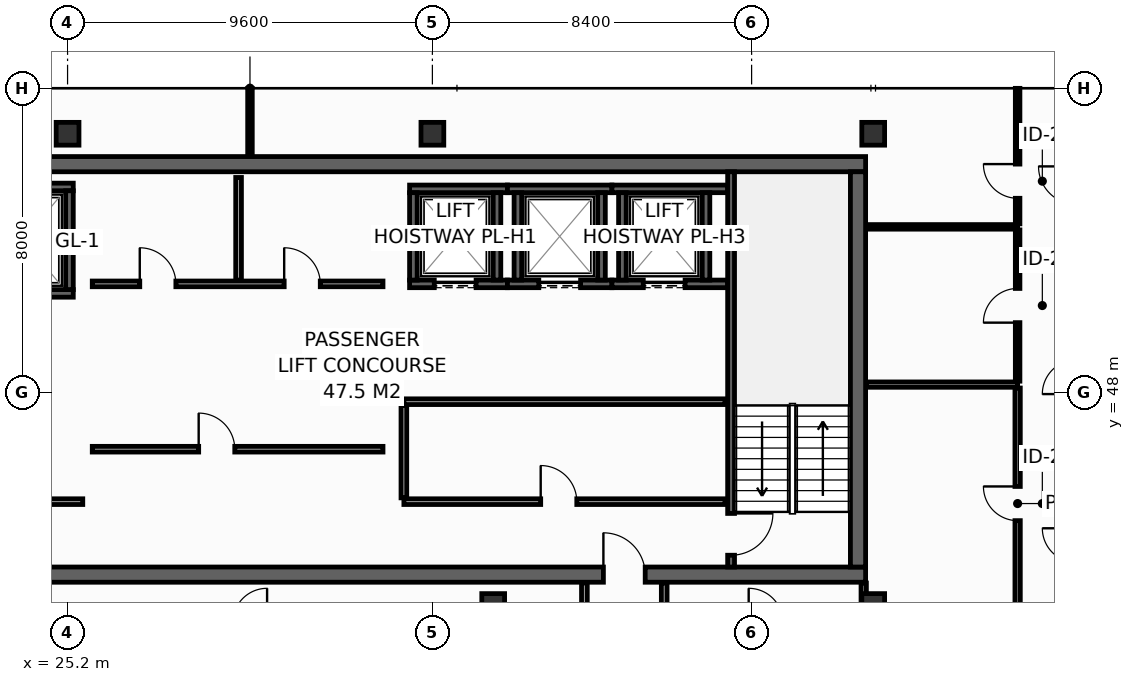
"""IFC4 building model, lengths in metres.
Left out: names, types, materials, properties, quantities, classifications, styles, units other than length and angle.
Written with IfcOpenShell. Run it as: python <this file> out.ifc"""

import sys

from ifc_helpers import new_model, si_unit, direction, frame, frame_2d, origin, origin_2d, place, context, subcontext, project, spatial, rectangle, hollow_rectangle, extrude, element, fill, save


model = new_model("IFC4")
c1 = context("Model", 3, precision=1e-05, world=origin(), true_north=direction((0.0, 1.0)))
c2 = subcontext(c1, "Body", "Model", "MODEL_VIEW")
j1 = project(units=[si_unit("LENGTHUNIT", "METRE"), si_unit("PLANEANGLEUNIT", "RADIAN")], contexts=[c1])
p1 = place(None, origin())
s1 = spatial("IfcSite", under=j1, at=p1, CompositionType="ELEMENT")
p2 = place(p1, origin())
s2 = spatial("IfcBuilding", under=s1, at=p2, CompositionType="ELEMENT")
p3 = place(p2, frame((0.0, 0.0, 306.6)))
s3 = spatial("IfcBuildingStorey", under=s2, at=p3, CompositionType="ELEMENT", Elevation=306.6)
p4 = place(p3, frame((13.7, 43.2, 0.0), z_axis=(0.0, 0.0, 1.0), x_axis=(1.0, 0.0, 0.0)))
e1 = element("IfcWall", 1, at=p4, inside=s3, PredefinedType="SHEAR", context=c2, shape_type="SweptSolid", body=[
    extrude(rectangle(XDim=32.5, YDim=0.4, at=frame_2d((16.25, 0.0))), origin(), (0.0, 0.0, 1.0), 3.55),
])
p5 = place(p4, frame((5.4, 0.0, 0.0)))
e2 = element("IfcOpeningElement", 2, at=p5, cuts=e1, PredefinedType="OPENING", context=c2, shape_type="SweptSolid", body=[
    extrude(rectangle(XDim=1.1, YDim=2.15, at=frame_2d((0.55, 1.075))), frame((0.0, 0.21, 0.0), z_axis=(0.0, -1.0, 0.0), x_axis=(1.0, 0.0, 0.0)), (0.0, 0.0, 1.0), 0.42),
])
p6 = place(p4, frame((25.6, 0.0, 0.0)))
e3 = element("IfcOpeningElement", 3, at=p6, cuts=e1, PredefinedType="OPENING", context=c2, shape_type="SweptSolid", body=[
    extrude(rectangle(XDim=1.1, YDim=2.15, at=frame_2d((0.55, 1.075))), frame((0.0, 0.21, 0.0), z_axis=(0.0, -1.0, 0.0), x_axis=(1.0, 0.0, 0.0)), (0.0, 0.0, 1.0), 0.42),
])
p7 = place(p3, frame((13.7, 54.0, 0.0), z_axis=(0.0, 0.0, 1.0), x_axis=(1.0, 0.0, 0.0)))
e4 = element("IfcWall", 4, at=p7, inside=s3, PredefinedType="SHEAR", context=c2, shape_type="SweptSolid", body=[
    extrude(rectangle(XDim=32.5, YDim=0.4, at=frame_2d((16.25, 0.0))), origin(), (0.0, 0.0, 1.0), 3.55),
])
p8 = place(p3, frame((46.0, 43.4, 0.0), z_axis=(0.0, 0.0, 1.0), x_axis=(0.0, 1.0, 0.0)))
e5 = element("IfcWall", 5, at=p8, inside=s3, PredefinedType="SHEAR", context=c2, shape_type="SweptSolid", body=[
    extrude(rectangle(XDim=10.4, YDim=0.4, at=frame_2d((5.2, 0.0))), origin(), (0.0, 0.0, 1.0), 3.55),
])
for number, where, z_axis, x_axis in (
    (6, (25.2, 54.8, 0.0), (0.0, 0.0, 1.0), (1.0, 0.0, 0.0)),
    (7, (34.8, 54.8, 0.0), (0.0, 0.0, 1.0), (1.0, 0.0, 0.0)),
    (8, (46.4, 54.8, 0.0), (0.0, 0.0, 1.0), (1.0, 0.0, 0.0)),
    (9, (36.4, 42.4, 0.0), (0.0, 0.0, 1.0), (1.0, 0.0, 0.0)),
    (10, (46.4, 42.4, 0.0), (0.0, 0.0, 1.0), (1.0, 0.0, 0.0)),
):
    element("IfcColumn", number, at=place(p3, frame(where, z_axis=z_axis, x_axis=x_axis)), inside=s3, PredefinedType="COLUMN", context=c2, shape_type="SweptSolid", body=[
        extrude(hollow_rectangle(XDim=0.6, YDim=0.6, WallThickness=0.028, at=origin_2d()), origin(), (0.0, 0.0, 1.0), 3.8),
    ])
p9 = place(p3, frame((22.5, 50.6, 0.0), z_axis=(0.0, 0.0, 1.0), x_axis=(1.0, 0.0, 0.0)))
e11 = element("IfcWall", 11, at=p9, inside=s3, PredefinedType="SHEAR", context=c2, shape_type="SweptSolid", body=[
    extrude(rectangle(XDim=2.85, YDim=0.2, at=frame_2d((1.425, 0.0))), origin(), (0.0, 0.0, 1.0), 3.55),
])
p10 = place(p9, frame((0.925, 0.0, 0.0)))
e12 = element("IfcOpeningElement", 12, at=p10, cuts=e11, PredefinedType="OPENING", context=c2, shape_type="SweptSolid", body=[
    extrude(rectangle(XDim=1.25, YDim=2.3, at=frame_2d((0.625, 1.15))), frame((0.0, 0.11, 0.0), z_axis=(0.0, -1.0, 0.0), x_axis=(1.0, 0.0, 0.0)), (0.0, 0.0, 1.0), 0.22),
])
p11 = place(p3, frame((22.5, 53.4, 0.0), z_axis=(0.0, 0.0, 1.0), x_axis=(1.0, 0.0, 0.0)))
e13 = element("IfcWall", 13, at=p11, inside=s3, PredefinedType="SHEAR", context=c2, shape_type="SweptSolid", body=[
    extrude(rectangle(XDim=2.85, YDim=0.2, at=frame_2d((1.425, 0.0))), origin(), (0.0, 0.0, 1.0), 3.55),
])
p12 = place(p3, frame((25.25, 50.7, 0.0), z_axis=(0.0, 0.0, 1.0), x_axis=(0.0, 1.0, 0.0)))
e14 = element("IfcWall", 14, at=p12, inside=s3, PredefinedType="SHEAR", context=c2, shape_type="SweptSolid", body=[
    extrude(rectangle(XDim=2.6, YDim=0.2, at=frame_2d((1.3, 0.0))), origin(), (0.0, 0.0, 1.0), 3.55),
])
p13 = place(p3, frame((34.2, 50.85, 0.0), z_axis=(0.0, 0.0, 1.0), x_axis=(1.0, 0.0, 0.0)))
e15 = element("IfcWall", 15, at=p13, inside=s3, PredefinedType="SHEAR", context=c2, shape_type="SweptSolid", body=[
    extrude(rectangle(XDim=2.575, YDim=0.2, at=frame_2d((1.288, 0.0))), origin(), (0.0, 0.0, 1.0), 3.55),
])
p14 = place(p13, frame((0.65, 0.0, 0.0)))
e16 = element("IfcOpeningElement", 16, at=p14, cuts=e15, PredefinedType="OPENING", context=c2, shape_type="SweptSolid", body=[
    extrude(rectangle(XDim=1.1, YDim=2.2, at=frame_2d((0.55, 1.1))), frame((0.0, 0.11, 0.0), z_axis=(0.0, -1.0, 0.0), x_axis=(1.0, 0.0, 0.0)), (0.0, 0.0, 1.0), 0.22),
])
p15 = place(p3, frame((34.2, 53.35, 0.0), z_axis=(0.0, 0.0, 1.0), x_axis=(1.0, 0.0, 0.0)))
e17 = element("IfcWall", 17, at=p15, inside=s3, PredefinedType="SHEAR", context=c2, shape_type="SweptSolid", body=[
    extrude(rectangle(XDim=2.575, YDim=0.2, at=frame_2d((1.288, 0.0))), origin(), (0.0, 0.0, 1.0), 3.55),
])
for number, where, z_axis, x_axis in (
    (18, (34.3, 50.95, 0.0), (0.0, 0.0, 1.0), (0.0, 1.0, 0.0)),
    (19, (36.5, 50.95, 0.0), (0.0, 0.0, 1.0), (0.0, 1.0, 0.0)),
):
    element("IfcWall", number, at=place(p3, frame(where, z_axis=z_axis, x_axis=x_axis)), inside=s3, PredefinedType="SHEAR", context=c2, shape_type="SweptSolid", body=[
        extrude(rectangle(XDim=2.3, YDim=0.2, at=frame_2d((1.15, 0.0))), origin(), (0.0, 0.0, 1.0), 3.55),
    ])
p16 = place(p3, frame((36.775, 50.85, 0.0), z_axis=(0.0, 0.0, 1.0), x_axis=(1.0, 0.0, 0.0)))
e20 = element("IfcWall", 20, at=p16, inside=s3, PredefinedType="SHEAR", context=c2, shape_type="SweptSolid", body=[
    extrude(rectangle(XDim=2.75, YDim=0.2, at=frame_2d((1.375, 0.0))), origin(), (0.0, 0.0, 1.0), 3.55),
])
p17 = place(p16, frame((0.825, 0.0, 0.0)))
e21 = element("IfcOpeningElement", 21, at=p17, cuts=e20, PredefinedType="OPENING", context=c2, shape_type="SweptSolid", body=[
    extrude(rectangle(XDim=1.1, YDim=2.2, at=frame_2d((0.55, 1.1))), frame((0.0, 0.11, 0.0), z_axis=(0.0, -1.0, 0.0), x_axis=(1.0, 0.0, 0.0)), (0.0, 0.0, 1.0), 0.22),
])
p18 = place(p3, frame((36.775, 53.35, 0.0), z_axis=(0.0, 0.0, 1.0), x_axis=(1.0, 0.0, 0.0)))
e22 = element("IfcWall", 22, at=p18, inside=s3, PredefinedType="SHEAR", context=c2, shape_type="SweptSolid", body=[
    extrude(rectangle(XDim=2.75, YDim=0.2, at=frame_2d((1.375, 0.0))), origin(), (0.0, 0.0, 1.0), 3.55),
])
for number, where, z_axis, x_axis in (
    (23, (37.05, 50.95, 0.0), (0.0, 0.0, 1.0), (0.0, 1.0, 0.0)),
    (24, (39.25, 50.95, 0.0), (0.0, 0.0, 1.0), (0.0, 1.0, 0.0)),
):
    element("IfcWall", number, at=place(p3, frame(where, z_axis=z_axis, x_axis=x_axis)), inside=s3, PredefinedType="SHEAR", context=c2, shape_type="SweptSolid", body=[
        extrude(rectangle(XDim=2.3, YDim=0.2, at=frame_2d((1.15, 0.0))), origin(), (0.0, 0.0, 1.0), 3.55),
    ])
p19 = place(p3, frame((39.525, 50.85, 0.0), z_axis=(0.0, 0.0, 1.0), x_axis=(1.0, 0.0, 0.0)))
e25 = element("IfcWall", 25, at=p19, inside=s3, PredefinedType="SHEAR", context=c2, shape_type="SweptSolid", body=[
    extrude(rectangle(XDim=3.045, YDim=0.2, at=frame_2d((1.522, 0.0))), origin(), (0.0, 0.0, 1.0), 3.55),
])
p20 = place(p19, frame((0.825, 0.0, 0.0)))
e26 = element("IfcOpeningElement", 26, at=p20, cuts=e25, PredefinedType="OPENING", context=c2, shape_type="SweptSolid", body=[
    extrude(rectangle(XDim=1.1, YDim=2.2, at=frame_2d((0.55, 1.1))), frame((0.0, 0.11, 0.0), z_axis=(0.0, -1.0, 0.0), x_axis=(1.0, 0.0, 0.0)), (0.0, 0.0, 1.0), 0.22),
])
p21 = place(p3, frame((39.525, 53.35, 0.0), z_axis=(0.0, 0.0, 1.0), x_axis=(1.0, 0.0, 0.0)))
e27 = element("IfcWall", 27, at=p21, inside=s3, PredefinedType="SHEAR", context=c2, shape_type="SweptSolid", body=[
    extrude(rectangle(XDim=3.045, YDim=0.2, at=frame_2d((1.522, 0.0))), origin(), (0.0, 0.0, 1.0), 3.55),
])
for number, where, z_axis, x_axis in (
    (28, (39.8, 50.95, 0.0), (0.0, 0.0, 1.0), (0.0, 1.0, 0.0)),
    (29, (42.0, 50.95, 0.0), (0.0, 0.0, 1.0), (0.0, 1.0, 0.0)),
):
    element("IfcWall", number, at=place(p3, frame(where, z_axis=z_axis, x_axis=x_axis)), inside=s3, PredefinedType="SHEAR", context=c2, shape_type="SweptSolid", body=[
        extrude(rectangle(XDim=2.3, YDim=0.2, at=frame_2d((1.15, 0.0))), origin(), (0.0, 0.0, 1.0), 3.55),
    ])
p22 = place(p3, frame((42.66, 53.8, 0.0), z_axis=(0.0, 0.0, 1.0), x_axis=(0.0, -1.0, 0.0)))
e30 = element("IfcWall", 30, at=p22, inside=s3, PredefinedType="SHEAR", context=c2, shape_type="SweptSolid", body=[
    extrude(rectangle(XDim=10.4, YDim=0.18, at=frame_2d((5.2, 0.0))), origin(), (0.0, 0.0, 1.0), 3.55),
])
p23 = place(p22, frame((8.99, 0.0, 0.0)))
e31 = element("IfcOpeningElement", 31, at=p23, cuts=e30, PredefinedType="OPENING", context=c2, shape_type="SweptSolid", body=[
    extrude(rectangle(XDim=1.1, YDim=2.15, at=frame_2d((0.55, 1.075))), frame((0.0, 0.1, 0.0), z_axis=(0.0, -1.0, 0.0), x_axis=(1.0, 0.0, 0.0)), (0.0, 0.0, 1.0), 0.2),
])
p24 = place(p3, frame((22.68, 45.12, 0.0), z_axis=(0.0, 0.0, 1.0), x_axis=(1.0, 0.0, 0.0)))
e32 = element("IfcWall", 32, at=p24, inside=s3, PredefinedType="PARTITIONING", context=c2, shape_type="SweptSolid", body=[
    extrude(rectangle(XDim=2.92, YDim=0.15, at=frame_2d((1.46, 0.0))), origin(), (0.0, 0.0, 1.0), 3.55),
])
p25 = place(p24, frame((0.85, 0.0, 0.0)))
e33 = element("IfcOpeningElement", 33, at=p25, cuts=e32, PredefinedType="OPENING", context=c2, shape_type="SweptSolid", body=[
    extrude(rectangle(XDim=1.1, YDim=2.15, at=frame_2d((0.55, 1.075))), frame((0.0, 0.085, 0.0), z_axis=(0.0, -1.0, 0.0), x_axis=(1.0, 0.0, 0.0)), (0.0, 0.0, 1.0), 0.17),
])
p26 = place(p3, frame((34.05, 45.12, 0.0), z_axis=(0.0, 0.0, 1.0), x_axis=(1.0, 0.0, 0.0)))
e34 = element("IfcWall", 34, at=p26, inside=s3, PredefinedType="PARTITIONING", context=c2, shape_type="SweptSolid", body=[
    extrude(rectangle(XDim=8.45, YDim=0.15, at=frame_2d((4.225, 0.0))), origin(), (0.0, 0.0, 1.0), 3.55),
])
p27 = place(p26, frame((3.6, 0.0, 0.0)))
e35 = element("IfcOpeningElement", 35, at=p27, cuts=e34, PredefinedType="OPENING", context=c2, shape_type="SweptSolid", body=[
    extrude(rectangle(XDim=0.95, YDim=2.15, at=frame_2d((0.475, 1.075))), frame((0.0, 0.085, 0.0), z_axis=(0.0, -1.0, 0.0), x_axis=(1.0, 0.0, 0.0)), (0.0, 0.0, 1.0), 0.17),
])
p28 = place(p3, frame((34.05, 47.75, 0.0), z_axis=(0.0, 0.0, 1.0), x_axis=(1.0, 0.0, 0.0)))
e36 = element("IfcWall", 36, at=p28, inside=s3, PredefinedType="PARTITIONING", context=c2, shape_type="SweptSolid", body=[
    extrude(rectangle(XDim=8.45, YDim=0.15, at=frame_2d((4.225, 0.0))), origin(), (0.0, 0.0, 1.0), 3.55),
])
p29 = place(p3, frame((34.05, 45.22, 0.0), z_axis=(0.0, 0.0, 1.0), x_axis=(0.0, 1.0, 0.0)))
e37 = element("IfcWall", 37, at=p29, inside=s3, PredefinedType="PARTITIONING", context=c2, shape_type="SweptSolid", body=[
    extrude(rectangle(XDim=2.43, YDim=0.15, at=frame_2d((1.215, 0.0))), origin(), (0.0, 0.0, 1.0), 3.55),
])
p30 = place(p3, frame((25.85, 50.85, 0.0), z_axis=(0.0, 0.0, 1.0), x_axis=(1.0, 0.0, 0.0)))
e38 = element("IfcWall", 38, at=p30, inside=s3, PredefinedType="PARTITIONING", context=c2, shape_type="SweptSolid", body=[
    extrude(rectangle(XDim=7.65, YDim=0.15, at=frame_2d((3.825, 0.0))), origin(), (0.0, 0.0, 1.0), 3.55),
])
p31 = place(p30, frame((1.25, 0.0, 0.0)))
e39 = element("IfcOpeningElement", 39, at=p31, cuts=e38, PredefinedType="OPENING", context=c2, shape_type="SweptSolid", body=[
    extrude(rectangle(XDim=0.95, YDim=2.15, at=frame_2d((0.475, 1.075))), frame((0.0, 0.085, 0.0), z_axis=(0.0, -1.0, 0.0), x_axis=(1.0, 0.0, 0.0)), (0.0, 0.0, 1.0), 0.17),
])
p32 = place(p30, frame((5.05, 0.0, 0.0)))
e40 = element("IfcOpeningElement", 40, at=p32, cuts=e38, PredefinedType="OPENING", context=c2, shape_type="SweptSolid", body=[
    extrude(rectangle(XDim=0.95, YDim=2.15, at=frame_2d((0.475, 1.075))), frame((0.0, 0.085, 0.0), z_axis=(0.0, -1.0, 0.0), x_axis=(1.0, 0.0, 0.0)), (0.0, 0.0, 1.0), 0.17),
])
p33 = place(p3, frame((29.7, 50.95, 0.0), z_axis=(0.0, 0.0, 1.0), x_axis=(0.0, 1.0, 0.0)))
e41 = element("IfcWall", 41, at=p33, inside=s3, PredefinedType="PARTITIONING", context=c2, shape_type="SweptSolid", body=[
    extrude(rectangle(XDim=2.7, YDim=0.15, at=frame_2d((1.35, 0.0))), origin(), (0.0, 0.0, 1.0), 3.55),
])
p34 = place(p3, frame((25.85, 46.5, 0.0), z_axis=(0.0, 0.0, 1.0), x_axis=(1.0, 0.0, 0.0)))
e42 = element("IfcWall", 42, at=p34, inside=s3, PredefinedType="PARTITIONING", context=c2, shape_type="SweptSolid", body=[
    extrude(rectangle(XDim=7.65, YDim=0.15, at=frame_2d((3.825, 0.0))), origin(), (0.0, 0.0, 1.0), 3.55),
])
p35 = place(p34, frame((2.8, 0.0, 0.0)))
e43 = element("IfcOpeningElement", 43, at=p35, cuts=e42, PredefinedType="OPENING", context=c2, shape_type="SweptSolid", body=[
    extrude(rectangle(XDim=0.95, YDim=2.15, at=frame_2d((0.475, 1.075))), frame((0.0, 0.085, 0.0), z_axis=(0.0, -1.0, 0.0), x_axis=(1.0, 0.0, 0.0)), (0.0, 0.0, 1.0), 0.17),
])
p36 = place(p3, frame((46.15, 42.03, 0.0), z_axis=(0.0, 0.0, 1.0), x_axis=(0.0, 1.0, 0.0)))
e44 = element("IfcWall", 44, at=p36, inside=s3, PredefinedType="PARTITIONING", context=c2, shape_type="SweptSolid", body=[
    extrude(rectangle(XDim=0.95, YDim=0.14, at=frame_2d((0.475, 0.0))), origin(), (0.0, 0.0, 1.0), 3.55),
])
p37 = place(p3, frame((46.22, 48.2, 0.0), z_axis=(0.0, 0.0, 1.0), x_axis=(1.0, 0.0, 0.0)))
e45 = element("IfcWall", 45, at=p37, inside=s3, PredefinedType="PARTITIONING", context=c2, shape_type="SweptSolid", body=[
    extrude(rectangle(XDim=3.98, YDim=0.14, at=frame_2d((1.99, 0.0))), origin(), (0.0, 0.0, 1.0), 3.55),
])
p38 = place(p3, frame((50.2, 42.03, 0.0), z_axis=(0.0, 0.0, 1.0), x_axis=(0.0, 1.0, 0.0)))
e46 = element("IfcWall", 46, at=p38, inside=s3, PredefinedType="PARTITIONING", context=c2, shape_type="SweptSolid", body=[
    extrude(rectangle(XDim=6.08, YDim=0.14, at=frame_2d((3.04, 0.0))), origin(), (0.0, 0.0, 1.0), 2.947),
])
p39 = place(p38, frame((2.59, 0.0, 0.0)))
e47 = element("IfcOpeningElement", 47, at=p39, cuts=e46, PredefinedType="OPENING", context=c2, shape_type="SweptSolid", body=[
    extrude(rectangle(XDim=0.9, YDim=2.1, at=frame_2d((0.45, 1.05))), frame((0.0, 0.08, 0.0), z_axis=(0.0, -1.0, 0.0), x_axis=(1.0, 0.0, 0.0)), (0.0, 0.0, 1.0), 0.16),
])
p40 = place(p3, frame((46.22, 52.35, 0.0), z_axis=(0.0, 0.0, 1.0), x_axis=(1.0, 0.0, 0.0)))
e48 = element("IfcWall", 48, at=p40, inside=s3, PredefinedType="PARTITIONING", context=c2, shape_type="SweptSolid", body=[
    extrude(rectangle(XDim=3.98, YDim=0.12, at=frame_2d((1.99, 0.0))), origin(), (0.0, 0.0, 1.0), 3.55),
])
p41 = place(p3, frame((30.0, 54.22, 0.0), z_axis=(0.0, 0.0, 1.0), x_axis=(0.0, 1.0, 0.0)))
e49 = element("IfcWall", 49, at=p41, inside=s3, PredefinedType="PARTITIONING", context=c2, shape_type="SweptSolid", body=[
    extrude(rectangle(XDim=1.775, YDim=0.12, at=frame_2d((0.888, 0.0))), origin(), (0.0, 0.0, 1.0), 2.935),
])
p42 = place(p3, frame((50.2, 48.29, 0.0), z_axis=(0.0, 0.0, 1.0), x_axis=(0.0, 1.0, 0.0)))
e50 = element("IfcWall", 50, at=p42, inside=s3, PredefinedType="PARTITIONING", context=c2, shape_type="SweptSolid", body=[
    extrude(rectangle(XDim=3.98, YDim=0.12, at=frame_2d((1.99, 0.0))), origin(), (0.0, 0.0, 1.0), 3.55),
])
p43 = place(p42, frame((1.54, 0.0, 0.0)))
e51 = element("IfcOpeningElement", 51, at=p43, cuts=e50, PredefinedType="OPENING", context=c2, shape_type="SweptSolid", body=[
    extrude(rectangle(XDim=0.9, YDim=2.1, at=frame_2d((0.45, 1.05))), frame((0.0, 0.07, 0.0), z_axis=(0.0, -1.0, 0.0), x_axis=(1.0, 0.0, 0.0)), (0.0, 0.0, 1.0), 0.14),
])
p44 = place(p3, frame((50.2, 52.43, 0.0), z_axis=(0.0, 0.0, 1.0), x_axis=(0.0, 1.0, 0.0)))
e52 = element("IfcWall", 52, at=p44, inside=s3, PredefinedType="PARTITIONING", context=c2, shape_type="SweptSolid", body=[
    extrude(rectangle(XDim=3.565, YDim=0.12, at=frame_2d((1.783, 0.0))), origin(), (0.0, 0.0, 1.0), 2.935),
])
p45 = place(p44, frame((0.672, 0.0, 0.0)))
e53 = element("IfcOpeningElement", 53, at=p45, cuts=e52, PredefinedType="OPENING", context=c2, shape_type="SweptSolid", body=[
    extrude(rectangle(XDim=0.9, YDim=2.1, at=frame_2d((0.45, 1.05))), frame((0.0, 0.07, 0.0), z_axis=(0.0, -1.0, 0.0), x_axis=(1.0, 0.0, 0.0)), (0.0, 0.0, 1.0), 0.14),
])
for number, where, z_axis, x_axis in (
    (54, (38.8, 41.94, 0.0), (0.0, 0.0, 1.0), (0.0, 1.0, 0.0)),
    (55, (40.9, 41.94, 0.0), (0.0, 0.0, 1.0), (0.0, 1.0, 0.0)),
):
    element("IfcWall", number, at=place(p3, frame(where, z_axis=z_axis, x_axis=x_axis)), inside=s3, PredefinedType="PARTITIONING", context=c2, shape_type="SweptSolid", body=[
        extrude(rectangle(XDim=1.04, YDim=0.15, at=frame_2d((0.52, 0.0))), origin(), (0.0, 0.0, 1.0), 3.55),
    ])
p46 = place(p14, origin())
e56 = element("IfcDoor", 56, at=p46, inside=s3, OperationType="SLIDING_TO_LEFT", PredefinedType="DOOR", context=c2, shape_type="SweptSolid", body=[
    extrude(rectangle(XDim=1.1, YDim=2.2, at=frame_2d((0.55, 1.1))), frame((0.0, 0.025, 0.0), z_axis=(0.0, -1.0, 0.0), x_axis=(1.0, 0.0, 0.0)), (0.0, 0.0, 1.0), 0.05),
])
fill(e16, e56)
p47 = place(p17, origin())
e57 = element("IfcDoor", 57, at=p47, inside=s3, OperationType="SLIDING_TO_LEFT", PredefinedType="DOOR", context=c2, shape_type="SweptSolid", body=[
    extrude(rectangle(XDim=1.1, YDim=2.2, at=frame_2d((0.55, 1.1))), frame((0.0, 0.025, 0.0), z_axis=(0.0, -1.0, 0.0), x_axis=(1.0, 0.0, 0.0)), (0.0, 0.0, 1.0), 0.05),
])
fill(e21, e57)
p48 = place(p20, origin())
e58 = element("IfcDoor", 58, at=p48, inside=s3, OperationType="SLIDING_TO_LEFT", PredefinedType="DOOR", context=c2, shape_type="SweptSolid", body=[
    extrude(rectangle(XDim=1.1, YDim=2.2, at=frame_2d((0.55, 1.1))), frame((0.0, 0.025, 0.0), z_axis=(0.0, -1.0, 0.0), x_axis=(1.0, 0.0, 0.0)), (0.0, 0.0, 1.0), 0.05),
])
fill(e26, e58)
p49 = place(p23, origin())
e59 = element("IfcDoor", 59, at=p49, inside=s3, OperationType="SINGLE_SWING_LEFT", PredefinedType="DOOR", context=c2, shape_type="SweptSolid", body=[
    extrude(rectangle(XDim=1.1, YDim=2.15, at=frame_2d((0.55, 1.075))), frame((0.0, 0.025, 0.0), z_axis=(0.0, -1.0, 0.0), x_axis=(1.0, 0.0, 0.0)), (0.0, 0.0, 1.0), 0.05),
])
fill(e31, e59)
p50 = place(p6, origin())
e60 = element("IfcDoor", 60, at=p50, inside=s3, OperationType="SINGLE_SWING_LEFT", PredefinedType="DOOR", context=c2, shape_type="SweptSolid", body=[
    extrude(rectangle(XDim=1.1, YDim=2.15, at=frame_2d((0.55, 1.075))), frame((0.0, 0.025, 0.0), z_axis=(0.0, -1.0, 0.0), x_axis=(1.0, 0.0, 0.0)), (0.0, 0.0, 1.0), 0.05),
])
fill(e3, e60)
p51 = place(p27, origin())
e61 = element("IfcDoor", 61, at=p51, inside=s3, OperationType="SINGLE_SWING_LEFT", PredefinedType="DOOR", context=c2, shape_type="SweptSolid", body=[
    extrude(rectangle(XDim=0.95, YDim=2.15, at=frame_2d((0.475, 1.075))), frame((0.0, 0.025, 0.0), z_axis=(0.0, -1.0, 0.0), x_axis=(1.0, 0.0, 0.0)), (0.0, 0.0, 1.0), 0.05),
])
fill(e35, e61)
p52 = place(p31, origin())
e62 = element("IfcDoor", 62, at=p52, inside=s3, OperationType="SINGLE_SWING_LEFT", PredefinedType="DOOR", context=c2, shape_type="SweptSolid", body=[
    extrude(rectangle(XDim=0.95, YDim=2.15, at=frame_2d((0.475, 1.075))), frame((0.0, 0.025, 0.0), z_axis=(0.0, -1.0, 0.0), x_axis=(1.0, 0.0, 0.0)), (0.0, 0.0, 1.0), 0.05),
])
fill(e39, e62)
p53 = place(p32, origin())
e63 = element("IfcDoor", 63, at=p53, inside=s3, OperationType="SINGLE_SWING_LEFT", PredefinedType="DOOR", context=c2, shape_type="SweptSolid", body=[
    extrude(rectangle(XDim=0.95, YDim=2.15, at=frame_2d((0.475, 1.075))), frame((0.0, 0.025, 0.0), z_axis=(0.0, -1.0, 0.0), x_axis=(1.0, 0.0, 0.0)), (0.0, 0.0, 1.0), 0.05),
])
fill(e40, e63)
p54 = place(p35, origin())
e64 = element("IfcDoor", 64, at=p54, inside=s3, OperationType="SINGLE_SWING_LEFT", PredefinedType="DOOR", context=c2, shape_type="SweptSolid", body=[
    extrude(rectangle(XDim=0.95, YDim=2.15, at=frame_2d((0.475, 1.075))), frame((0.0, 0.025, 0.0), z_axis=(0.0, -1.0, 0.0), x_axis=(1.0, 0.0, 0.0)), (0.0, 0.0, 1.0), 0.05),
])
fill(e43, e64)
p55 = place(p39, origin())
e65 = element("IfcDoor", 65, at=p55, inside=s3, OperationType="SINGLE_SWING_RIGHT", PredefinedType="DOOR", context=c2, shape_type="SweptSolid", body=[
    extrude(rectangle(XDim=0.9, YDim=2.1, at=frame_2d((0.45, 1.05))), frame((0.0, 0.025, 0.0), z_axis=(0.0, -1.0, 0.0), x_axis=(1.0, 0.0, 0.0)), (0.0, 0.0, 1.0), 0.05),
])
fill(e47, e65)
p56 = place(p43, origin())
e66 = element("IfcDoor", 66, at=p56, inside=s3, OperationType="SINGLE_SWING_LEFT", PredefinedType="DOOR", context=c2, shape_type="SweptSolid", body=[
    extrude(rectangle(XDim=0.9, YDim=2.1, at=frame_2d((0.45, 1.05))), frame((0.0, 0.025, 0.0), z_axis=(0.0, -1.0, 0.0), x_axis=(1.0, 0.0, 0.0)), (0.0, 0.0, 1.0), 0.05),
])
fill(e51, e66)
p57 = place(p45, origin())
e67 = element("IfcDoor", 67, at=p57, inside=s3, OperationType="SINGLE_SWING_RIGHT", PredefinedType="DOOR", context=c2, shape_type="SweptSolid", body=[
    extrude(rectangle(XDim=0.9, YDim=2.1, at=frame_2d((0.45, 1.05))), frame((0.0, 0.025, 0.0), z_axis=(0.0, -1.0, 0.0), x_axis=(1.0, 0.0, 0.0)), (0.0, 0.0, 1.0), 0.05),
])
fill(e53, e67)
save(model, sys.argv[1])
